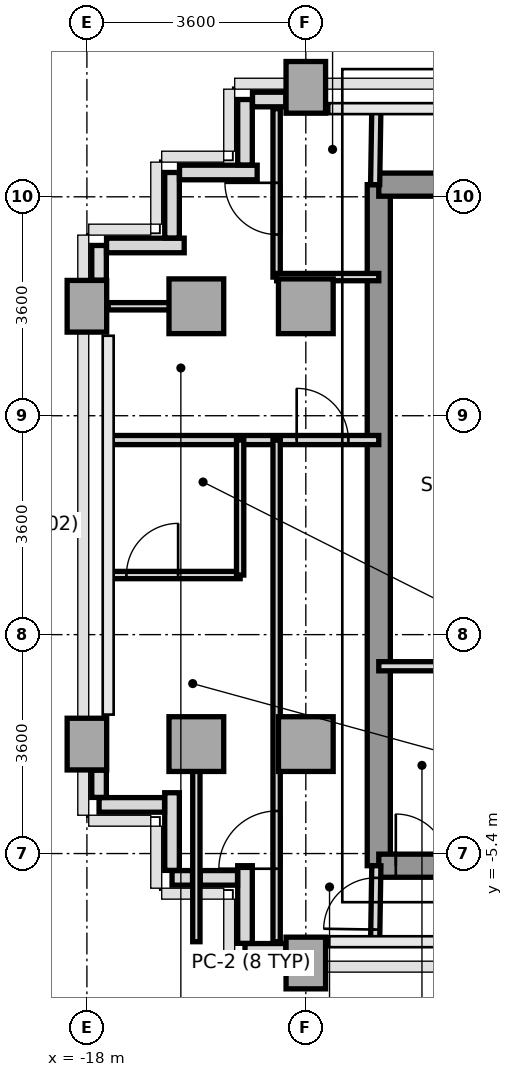
"""IFC4 building model, lengths in metres.
Left out: names, types, materials, properties, quantities, classifications, styles, units other than length and angle.
Written with IfcOpenShell. Run it as: python <this file> out.ifc"""

import sys

from ifc_helpers import new_model, si_unit, direction, frame, frame_2d, origin, origin_2d, place, context, subcontext, project, spatial, rectangle, extrude, source, transform, mapped, element, fill, save


model = new_model("IFC4")
c1 = context("Model", 3, precision=1e-05, world=origin(), true_north=direction((0.0, 1.0)))
c2 = subcontext(c1, "Body", "Model", "MODEL_VIEW")
j1 = project(units=[si_unit("LENGTHUNIT", "METRE"), si_unit("PLANEANGLEUNIT", "RADIAN")], contexts=[c1])
p1 = place(None, origin())
s1 = spatial("IfcSite", under=j1, at=p1, CompositionType="ELEMENT")
p2 = place(p1, origin())
s2 = spatial("IfcBuilding", under=s1, at=p2, CompositionType="ELEMENT")
p3 = place(p2, frame((0.0, 0.0, 187.6)))
s3 = spatial("IfcBuildingStorey", under=s2, at=p3, CompositionType="ELEMENT", Elevation=187.6)
m1 = source(origin(), c2, "Body", "SweptSolid", [
    extrude(rectangle(XDim=0.65, YDim=0.85, at=origin_2d()), origin(), (0.0, 0.0, 1.0), 3.2),
])
for number, where, z_axis, x_axis in (
    (1, (-18.0, -3.6, 0.0), (0.0, 0.0, 1.0), (1.0, 0.0, 0.0)),
    (2, (-18.0, 3.6, 0.0), (0.0, 0.0, 1.0), (1.0, 0.0, 0.0)),
):
    element("IfcColumn", number, at=place(p3, frame(where, z_axis=z_axis, x_axis=x_axis)), inside=s3, PredefinedType="COLUMN", context=c2, shape_type="MappedRepresentation", body=[
        mapped(m1, transform((0.0, 0.0, 0.0), x_axis=(1.0, 0.0, 0.0), y_axis=(0.0, 1.0, 0.0), z_axis=(0.0, 0.0, 1.0), scale=1.0)),
    ])
m2 = source(origin(), c2, "Body", "SweptSolid", [
    extrude(rectangle(XDim=0.9, YDim=0.9, at=origin_2d()), origin(), (0.0, 0.0, 1.0), 3.2),
])
for number, where, z_axis, x_axis in (
    (3, (-16.2, -3.6, 0.0), (0.0, 0.0, 1.0), (1.0, 0.0, 0.0)),
    (4, (-16.2, 3.6, 0.0), (0.0, 0.0, 1.0), (1.0, 0.0, 0.0)),
):
    element("IfcColumn", number, at=place(p3, frame(where, z_axis=z_axis, x_axis=x_axis)), inside=s3, PredefinedType="COLUMN", context=c2, shape_type="MappedRepresentation", body=[
        mapped(m2, transform((0.0, 0.0, 0.0), x_axis=(1.0, 0.0, 0.0), y_axis=(0.0, 1.0, 0.0), z_axis=(0.0, 0.0, 1.0), scale=1.0)),
    ])
p4 = place(p3, frame((-14.4, -7.2, 0.0), z_axis=(0.0, 0.0, 1.0), x_axis=(1.0, 0.0, 0.0)))
e5 = element("IfcColumn", 5, at=p4, inside=s3, PredefinedType="COLUMN", context=c2, shape_type="MappedRepresentation", body=[
    mapped(m1, transform((0.0, 0.0, 0.0), x_axis=(1.0, 0.0, 0.0), y_axis=(0.0, 1.0, 0.0), z_axis=(0.0, 0.0, 1.0), scale=1.0)),
])
for number, where, z_axis, x_axis in (
    (6, (-14.4, -3.6, 0.0), (0.0, 0.0, 1.0), (1.0, 0.0, 0.0)),
    (7, (-14.4, 3.6, 0.0), (0.0, 0.0, 1.0), (1.0, 0.0, 0.0)),
):
    element("IfcColumn", number, at=place(p3, frame(where, z_axis=z_axis, x_axis=x_axis)), inside=s3, PredefinedType="COLUMN", context=c2, shape_type="MappedRepresentation", body=[
        mapped(m2, transform((0.0, 0.0, 0.0), x_axis=(1.0, 0.0, 0.0), y_axis=(0.0, 1.0, 0.0), z_axis=(0.0, 0.0, 1.0), scale=1.0)),
    ])
p5 = place(p3, frame((-14.4, 7.2, 0.0), z_axis=(0.0, 0.0, 1.0), x_axis=(1.0, 0.0, 0.0)))
e8 = element("IfcColumn", 8, at=p5, inside=s3, PredefinedType="COLUMN", context=c2, shape_type="MappedRepresentation", body=[
    mapped(m1, transform((0.0, 0.0, 0.0), x_axis=(1.0, 0.0, 0.0), y_axis=(0.0, 1.0, 0.0), z_axis=(0.0, 0.0, 1.0), scale=1.0)),
])
p6 = place(p3, frame((-14.728, -7.0, 0.0), z_axis=(0.0, 0.0, 1.0), x_axis=(-1.0, 0.0, 0.0)))
e9 = element("IfcWall", 9, at=p6, inside=s3, PredefinedType="PARAPET", context=c2, shape_type="SweptSolid", body=[
    extrude(rectangle(XDim=0.672, YDim=0.24, at=frame_2d((0.336, 0.0))), origin(), (0.0, 0.0, 1.0), 1.15),
])
p7 = place(p3, frame((-15.4, -6.877, 0.0), z_axis=(0.0, 0.0, 1.0), x_axis=(0.0, 1.0, 0.0)))
e10 = element("IfcWall", 10, at=p7, inside=s3, PredefinedType="PARAPET", context=c2, shape_type="SweptSolid", body=[
    extrude(rectangle(XDim=1.277, YDim=0.24, at=frame_2d((0.638, 0.0))), origin(), (0.0, 0.0, 1.0), 1.15),
])
p8 = place(p3, frame((-15.523, -5.8, 0.0), z_axis=(0.0, 0.0, 1.0), x_axis=(-1.0, 0.0, 0.0)))
e11 = element("IfcWall", 11, at=p8, inside=s3, PredefinedType="PARAPET", context=c2, shape_type="SweptSolid", body=[
    extrude(rectangle(XDim=0.614, YDim=0.24, at=frame_2d((0.307, 0.0))), origin(), (0.0, 0.0, 1.0), 1.15),
])
p9 = place(p3, frame((-16.263, -5.8, 0.0), z_axis=(0.0, 0.0, 1.0), x_axis=(-1.0, 0.0, 0.0)))
e12 = element("IfcWall", 12, at=p9, inside=s3, PredefinedType="PARAPET", context=c2, shape_type="SweptSolid", body=[
    extrude(rectangle(XDim=0.337, YDim=0.24, at=frame_2d((0.168, 0.0))), origin(), (0.0, 0.0, 1.0), 1.15),
])
p10 = place(p3, frame((-16.6, -5.677, 0.0), z_axis=(0.0, 0.0, 1.0), x_axis=(0.0, 1.0, 0.0)))
e13 = element("IfcWall", 13, at=p10, inside=s3, PredefinedType="PARAPET", context=c2, shape_type="SweptSolid", body=[
    extrude(rectangle(XDim=1.277, YDim=0.24, at=frame_2d((0.639, 0.0))), origin(), (0.0, 0.0, 1.0), 1.15),
])
p11 = place(p3, frame((-16.723, -4.6, 0.0), z_axis=(0.0, 0.0, 1.0), x_axis=(-1.0, 0.0, 0.0)))
e14 = element("IfcWall", 14, at=p11, inside=s3, PredefinedType="PARAPET", context=c2, shape_type="SweptSolid", body=[
    extrude(rectangle(XDim=1.077, YDim=0.24, at=frame_2d((0.539, 0.0))), origin(), (0.0, 0.0, 1.0), 1.15),
])
p12 = place(p3, frame((-17.8, -4.477, 0.0), z_axis=(0.0, 0.0, 1.0), x_axis=(0.0, 1.0, 0.0)))
e15 = element("IfcWall", 15, at=p12, inside=s3, PredefinedType="PARAPET", context=c2, shape_type="SweptSolid", body=[
    extrude(rectangle(XDim=0.449, YDim=0.24, at=frame_2d((0.225, 0.0))), origin(), (0.0, 0.0, 1.0), 1.15),
])
p13 = place(p3, frame((-17.8, 4.028, 0.0), z_axis=(0.0, 0.0, 1.0), x_axis=(0.0, 1.0, 0.0)))
e16 = element("IfcWall", 16, at=p13, inside=s3, PredefinedType="PARAPET", context=c2, shape_type="SweptSolid", body=[
    extrude(rectangle(XDim=0.572, YDim=0.24, at=frame_2d((0.286, 0.0))), origin(), (0.0, 0.0, 1.0), 1.15),
])
p14 = place(p3, frame((-17.677, 4.6, 0.0), z_axis=(0.0, 0.0, 1.0), x_axis=(1.0, 0.0, 0.0)))
e17 = element("IfcWall", 17, at=p14, inside=s3, PredefinedType="PARAPET", context=c2, shape_type="SweptSolid", body=[
    extrude(rectangle(XDim=1.277, YDim=0.24, at=frame_2d((0.639, 0.0))), origin(), (0.0, 0.0, 1.0), 1.15),
])
p15 = place(p3, frame((-16.6, 4.723, 0.0), z_axis=(0.0, 0.0, 1.0), x_axis=(0.0, 1.0, 0.0)))
e18 = element("IfcWall", 18, at=p15, inside=s3, PredefinedType="PARAPET", context=c2, shape_type="SweptSolid", body=[
    extrude(rectangle(XDim=1.077, YDim=0.24, at=frame_2d((0.539, 0.0))), origin(), (0.0, 0.0, 1.0), 1.15),
])
p16 = place(p3, frame((-16.477, 5.8, 0.0), z_axis=(0.0, 0.0, 1.0), x_axis=(1.0, 0.0, 0.0)))
e19 = element("IfcWall", 19, at=p16, inside=s3, PredefinedType="PARAPET", context=c2, shape_type="SweptSolid", body=[
    extrude(rectangle(XDim=1.277, YDim=0.24, at=frame_2d((0.639, 0.0))), origin(), (0.0, 0.0, 1.0), 1.15),
])
p17 = place(p3, frame((-15.4, 5.923, 0.0), z_axis=(0.0, 0.0, 1.0), x_axis=(0.0, 1.0, 0.0)))
e20 = element("IfcWall", 20, at=p17, inside=s3, PredefinedType="PARAPET", context=c2, shape_type="SweptSolid", body=[
    extrude(rectangle(XDim=1.077, YDim=0.24, at=frame_2d((0.539, 0.0))), origin(), (0.0, 0.0, 1.0), 1.15),
])
p18 = place(p3, frame((-15.277, 7.0, 0.0), z_axis=(0.0, 0.0, 1.0), x_axis=(1.0, 0.0, 0.0)))
e21 = element("IfcWall", 21, at=p18, inside=s3, PredefinedType="PARAPET", context=c2, shape_type="SweptSolid", body=[
    extrude(rectangle(XDim=0.549, YDim=0.24, at=frame_2d((0.274, 0.0))), origin(), (0.0, 0.0, 1.0), 1.15),
])
p19 = place(p3, frame((-13.2, -5.6, 0.0), z_axis=(0.0, 0.0, 1.0), x_axis=(0.0, 1.0, 0.0)))
e22 = element("IfcWall", 22, at=p19, inside=s3, PredefinedType="SHEAR", context=c2, shape_type="SweptSolid", body=[
    extrude(rectangle(XDim=11.2, YDim=0.38, at=frame_2d((5.6, 0.0))), origin(), (0.0, 0.0, 1.0), 3.2),
])
p20 = place(p3, frame((-13.2, 5.6, 0.0), z_axis=(0.0, 0.0, 1.0), x_axis=(1.0, 0.0, 0.0)))
e23 = element("IfcWall", 23, at=p20, inside=s3, PredefinedType="SHEAR", context=c2, shape_type="SweptSolid", body=[
    extrude(rectangle(XDim=1.844, YDim=0.38, at=frame_2d((0.922, 0.0))), origin(), (0.0, 0.0, 1.0), 3.2),
])
p21 = place(p3, frame((-13.2, -5.6, 0.0), z_axis=(0.0, 0.0, 1.0), x_axis=(1.0, 0.0, 0.0)))
e24 = element("IfcWall", 24, at=p21, inside=s3, PredefinedType="SHEAR", context=c2, shape_type="SweptSolid", body=[
    extrude(rectangle(XDim=7.8, YDim=0.38, at=frame_2d((3.9, 0.0))), origin(), (0.0, 0.0, 1.0), 3.2),
])
p22 = place(p21, frame((0.28, 0.0, 0.0)))
e25 = element("IfcOpeningElement", 25, at=p22, cuts=e24, PredefinedType="OPENING", context=c2, shape_type="SweptSolid", body=[
    extrude(rectangle(XDim=0.85, YDim=2.1, at=frame_2d((0.425, 1.05))), frame((0.0, 0.2, 0.0), z_axis=(0.0, -1.0, 0.0), x_axis=(1.0, 0.0, 0.0)), (0.0, 0.0, 1.0), 0.4),
])
p23 = place(p21, frame((1.36, 0.0, 0.0)))
e26 = element("IfcOpeningElement", 26, at=p23, cuts=e24, PredefinedType="OPENING", context=c2, shape_type="SweptSolid", body=[
    extrude(rectangle(XDim=0.85, YDim=2.1, at=frame_2d((0.425, 1.05))), frame((0.0, 0.2, 0.0), z_axis=(0.0, -1.0, 0.0), x_axis=(1.0, 0.0, 0.0)), (0.0, 0.0, 1.0), 0.4),
])
p24 = place(p21, frame((2.85, 0.0, 0.0)))
e27 = element("IfcOpeningElement", 27, at=p24, cuts=e24, PredefinedType="OPENING", context=c2, shape_type="SweptSolid", body=[
    extrude(rectangle(XDim=0.85, YDim=2.1, at=frame_2d((0.425, 1.05))), frame((0.0, 0.2, 0.0), z_axis=(0.0, -1.0, 0.0), x_axis=(1.0, 0.0, 0.0)), (0.0, 0.0, 1.0), 0.4),
])
p25 = place(p21, frame((4.55, 0.0, 0.0)))
e28 = element("IfcOpeningElement", 28, at=p25, cuts=e24, PredefinedType="OPENING", context=c2, shape_type="SweptSolid", body=[
    extrude(rectangle(XDim=0.85, YDim=2.1, at=frame_2d((0.425, 1.05))), frame((0.0, 0.2, 0.0), z_axis=(0.0, -1.0, 0.0), x_axis=(1.0, 0.0, 0.0)), (0.0, 0.0, 1.0), 0.4),
])
p26 = place(p21, frame((6.25, 0.0, 0.0)))
e29 = element("IfcOpeningElement", 29, at=p26, cuts=e24, PredefinedType="OPENING", context=c2, shape_type="SweptSolid", body=[
    extrude(rectangle(XDim=0.85, YDim=2.1, at=frame_2d((0.425, 1.05))), frame((0.0, 0.2, 0.0), z_axis=(0.0, -1.0, 0.0), x_axis=(1.0, 0.0, 0.0)), (0.0, 0.0, 1.0), 0.4),
])
p27 = place(p3, frame((-13.2, -2.32, 0.0), z_axis=(0.0, 0.0, 1.0), x_axis=(1.0, 0.0, 0.0)))
e30 = element("IfcWall", 30, at=p27, inside=s3, PredefinedType="PARTITIONING", context=c2, shape_type="SweptSolid", body=[
    extrude(rectangle(XDim=2.18, YDim=0.15, at=frame_2d((1.09, 0.0))), origin(), (0.0, 0.0, 1.0), 3.2),
])
p28 = place(p3, frame((-13.26, -6.85, 0.0), z_axis=(0.0, 0.0, 1.0), x_axis=(0.016013571389, 0.999871774545, 0.0)))
e31 = element("IfcWall", 31, at=p28, inside=s3, PredefinedType="PARTITIONING", context=c2, shape_type="SweptSolid", body=[
    extrude(rectangle(XDim=1.25, YDim=0.15, at=frame_2d((0.625, 0.0))), origin(), (0.0, 0.0, 1.0), 3.2),
])
p29 = place(p28, frame((0.2, 0.0, 0.0)))
e32 = element("IfcOpeningElement", 32, at=p29, cuts=e31, PredefinedType="OPENING", context=c2, shape_type="SweptSolid", body=[
    extrude(rectangle(XDim=0.85, YDim=2.1, at=frame_2d((0.425, 1.05))), frame((0.0, 0.085, 0.0), z_axis=(0.0, -1.0, 0.0), x_axis=(1.0, 0.0, 0.0)), (0.0, 0.0, 1.0), 0.17),
])
p30 = place(p3, frame((-13.26, 5.6, 0.0), z_axis=(0.0, 0.0, 1.0), x_axis=(0.016013571389, 0.999871774545, 0.0)))
e33 = element("IfcWall", 33, at=p30, inside=s3, PredefinedType="PARTITIONING", context=c2, shape_type="SweptSolid", body=[
    extrude(rectangle(XDim=1.25, YDim=0.15, at=frame_2d((0.625, 0.0))), origin(), (0.0, 0.0, 1.0), 3.2),
])
p31 = place(p3, frame((-17.65, 1.4, 0.0), z_axis=(0.0, 0.0, 1.0), x_axis=(1.0, 0.0, 0.0)))
e34 = element("IfcWall", 34, at=p31, inside=s3, PredefinedType="PARTITIONING", context=c2, shape_type="SweptSolid", body=[
    extrude(rectangle(XDim=4.45, YDim=0.15, at=frame_2d((2.225, 0.0))), origin(), (0.0, 0.0, 1.0), 2.8),
])
p32 = place(p31, frame((3.1, 0.0, 0.0)))
e35 = element("IfcOpeningElement", 35, at=p32, cuts=e34, PredefinedType="OPENING", context=c2, shape_type="SweptSolid", body=[
    extrude(rectangle(XDim=0.85, YDim=2.1, at=frame_2d((0.425, 1.05))), frame((0.0, 0.085, 0.0), z_axis=(0.0, -1.0, 0.0), x_axis=(1.0, 0.0, 0.0)), (0.0, 0.0, 1.0), 0.17),
])
p33 = place(p3, frame((-16.2, -6.85, 0.0), z_axis=(0.0, 0.0, 1.0), x_axis=(0.0, 1.0, 0.0)))
e36 = element("IfcWall", 36, at=p33, inside=s3, PredefinedType="PARTITIONING", context=c2, shape_type="SweptSolid", body=[
    extrude(rectangle(XDim=3.25, YDim=0.12, at=frame_2d((1.625, 0.0))), origin(), (0.0, 0.0, 1.0), 3.2),
])
p34 = place(p3, frame((-17.65, 3.6, 0.0), z_axis=(0.0, 0.0, 1.0), x_axis=(1.0, 0.0, 0.0)))
e37 = element("IfcWall", 37, at=p34, inside=s3, PredefinedType="PARTITIONING", context=c2, shape_type="SweptSolid", body=[
    extrude(rectangle(XDim=1.45, YDim=0.12, at=frame_2d((0.725, 0.0))), origin(), (0.0, 0.0, 1.0), 3.2),
])
p35 = place(p3, frame((-14.88, -6.85, 0.0), z_axis=(0.0, 0.0, 1.0), x_axis=(0.0, 1.0, 0.0)))
e38 = element("IfcWall", 38, at=p35, inside=s3, PredefinedType="PARTITIONING", context=c2, shape_type="SweptSolid", body=[
    extrude(rectangle(XDim=8.25, YDim=0.12, at=frame_2d((4.125, 0.0))), origin(), (0.0, 0.0, 1.0), 3.2),
])
p36 = place(p35, frame((1.2, 0.0, 0.0)))
e39 = element("IfcOpeningElement", 39, at=p36, cuts=e38, PredefinedType="OPENING", context=c2, shape_type="SweptSolid", body=[
    extrude(rectangle(XDim=0.95, YDim=2.15, at=frame_2d((0.475, 1.075))), frame((0.0, 0.07, 0.0), z_axis=(0.0, -1.0, 0.0), x_axis=(1.0, 0.0, 0.0)), (0.0, 0.0, 1.0), 0.14),
])
p37 = place(p3, frame((-17.65, -0.82, 0.0), z_axis=(0.0, 0.0, 1.0), x_axis=(1.0, 0.0, 0.0)))
e40 = element("IfcWall", 40, at=p37, inside=s3, PredefinedType="PARTITIONING", context=c2, shape_type="SweptSolid", body=[
    extrude(rectangle(XDim=2.17, YDim=0.12, at=frame_2d((1.085, 0.0))), origin(), (0.0, 0.0, 1.0), 2.8),
])
p38 = place(p37, frame((0.3, 0.0, 0.0)))
e41 = element("IfcOpeningElement", 41, at=p38, cuts=e40, PredefinedType="OPENING", context=c2, shape_type="SweptSolid", body=[
    extrude(rectangle(XDim=0.85, YDim=2.1, at=frame_2d((0.425, 1.05))), frame((0.0, 0.07, 0.0), z_axis=(0.0, -1.0, 0.0), x_axis=(1.0, 0.0, 0.0)), (0.0, 0.0, 1.0), 0.14),
])
p39 = place(p3, frame((-15.48, -0.82, 0.0), z_axis=(0.0, 0.0, 1.0), x_axis=(0.0, 1.0, 0.0)))
e42 = element("IfcWall", 42, at=p39, inside=s3, PredefinedType="PARTITIONING", context=c2, shape_type="SweptSolid", body=[
    extrude(rectangle(XDim=2.22, YDim=0.12, at=frame_2d((1.11, 0.0))), origin(), (0.0, 0.0, 1.0), 3.2),
])
p40 = place(p3, frame((-14.88, 4.08, 0.0), z_axis=(0.0, 0.0, 1.0), x_axis=(0.0, 1.0, 0.0)))
e43 = element("IfcWall", 43, at=p40, inside=s3, PredefinedType="PARTITIONING", context=c2, shape_type="SweptSolid", body=[
    extrude(rectangle(XDim=2.77, YDim=0.12, at=frame_2d((1.385, 0.0))), origin(), (0.0, 0.0, 1.0), 3.2),
])
p41 = place(p40, frame((0.7, 0.0, 0.0)))
e44 = element("IfcOpeningElement", 44, at=p41, cuts=e43, PredefinedType="OPENING", context=c2, shape_type="SweptSolid", body=[
    extrude(rectangle(XDim=0.85, YDim=2.1, at=frame_2d((0.425, 1.05))), frame((0.0, 0.07, 0.0), z_axis=(0.0, -1.0, 0.0), x_axis=(1.0, 0.0, 0.0)), (0.0, 0.0, 1.0), 0.14),
])
p42 = place(p3, frame((-14.88, 4.08, 0.0), z_axis=(0.0, 0.0, 1.0), x_axis=(1.0, 0.0, 0.0)))
e45 = element("IfcWall", 45, at=p42, inside=s3, PredefinedType="PARTITIONING", context=c2, shape_type="SweptSolid", body=[
    extrude(rectangle(XDim=1.68, YDim=0.12, at=frame_2d((0.84, 0.0))), origin(), (0.0, 0.0, 1.0), 2.8),
])
m3 = source(origin(), c2, "Body", "SweptSolid", [
    extrude(rectangle(XDim=0.85, YDim=2.1, at=frame_2d((0.425, 1.05))), frame((0.0, 0.025, 0.0), z_axis=(0.0, -1.0, 0.0), x_axis=(1.0, 0.0, 0.0)), (0.0, 0.0, 1.0), 0.05),
])
p43 = place(p22, origin())
e46 = element("IfcDoor", 46, at=p43, inside=s3, OperationType="SINGLE_SWING_LEFT", PredefinedType="DOOR", context=c2, shape_type="MappedRepresentation", body=[
    mapped(m3, transform((0.0, 0.0, 0.0), x_axis=(1.0, 0.0, 0.0), y_axis=(0.0, 1.0, 0.0), z_axis=(0.0, 0.0, 1.0), scale=1.0)),
])
fill(e25, e46)
p44 = place(p29, origin())
e47 = element("IfcDoor", 47, at=p44, inside=s3, OperationType="SINGLE_SWING_LEFT", PredefinedType="DOOR", context=c2, shape_type="MappedRepresentation", body=[
    mapped(m3, transform((0.0, 0.0, 0.0), x_axis=(1.0, 0.0, 0.0), y_axis=(0.0, 1.0, 0.0), z_axis=(0.0, 0.0, 1.0), scale=1.0)),
])
fill(e32, e47)
p45 = place(p38, origin())
e48 = element("IfcDoor", 48, at=p45, inside=s3, OperationType="SINGLE_SWING_RIGHT", PredefinedType="DOOR", context=c2, shape_type="MappedRepresentation", body=[
    mapped(m3, transform((0.0, 0.0, 0.0), x_axis=(1.0, 0.0, 0.0), y_axis=(0.0, 1.0, 0.0), z_axis=(0.0, 0.0, 1.0), scale=1.0)),
])
fill(e41, e48)
m4 = source(origin(), c2, "Body", "SweptSolid", [
    extrude(rectangle(XDim=0.95, YDim=2.15, at=frame_2d((0.475, 1.075))), frame((0.0, 0.025, 0.0), z_axis=(0.0, -1.0, 0.0), x_axis=(1.0, 0.0, 0.0)), (0.0, 0.0, 1.0), 0.05),
])
p46 = place(p36, origin())
e49 = element("IfcDoor", 49, at=p46, inside=s3, OperationType="SINGLE_SWING_LEFT", PredefinedType="DOOR", context=c2, shape_type="MappedRepresentation", body=[
    mapped(m4, transform((0.0, 0.0, 0.0), x_axis=(1.0, 0.0, 0.0), y_axis=(0.0, 1.0, 0.0), z_axis=(0.0, 0.0, 1.0), scale=1.0)),
])
fill(e39, e49)
p47 = place(p41, origin())
e50 = element("IfcDoor", 50, at=p47, inside=s3, OperationType="SINGLE_SWING_RIGHT", PredefinedType="DOOR", context=c2, shape_type="MappedRepresentation", body=[
    mapped(m3, transform((0.0, 0.0, 0.0), x_axis=(1.0, 0.0, 0.0), y_axis=(0.0, 1.0, 0.0), z_axis=(0.0, 0.0, 1.0), scale=1.0)),
])
fill(e44, e50)
p48 = place(p32, origin())
e51 = element("IfcDoor", 51, at=p48, inside=s3, OperationType="SINGLE_SWING_LEFT", PredefinedType="DOOR", context=c2, shape_type="MappedRepresentation", body=[
    mapped(m3, transform((0.0, 0.0, 0.0), x_axis=(1.0, 0.0, 0.0), y_axis=(0.0, 1.0, 0.0), z_axis=(0.0, 0.0, 1.0), scale=1.0)),
])
fill(e35, e51)
save(model, sys.argv[1])
